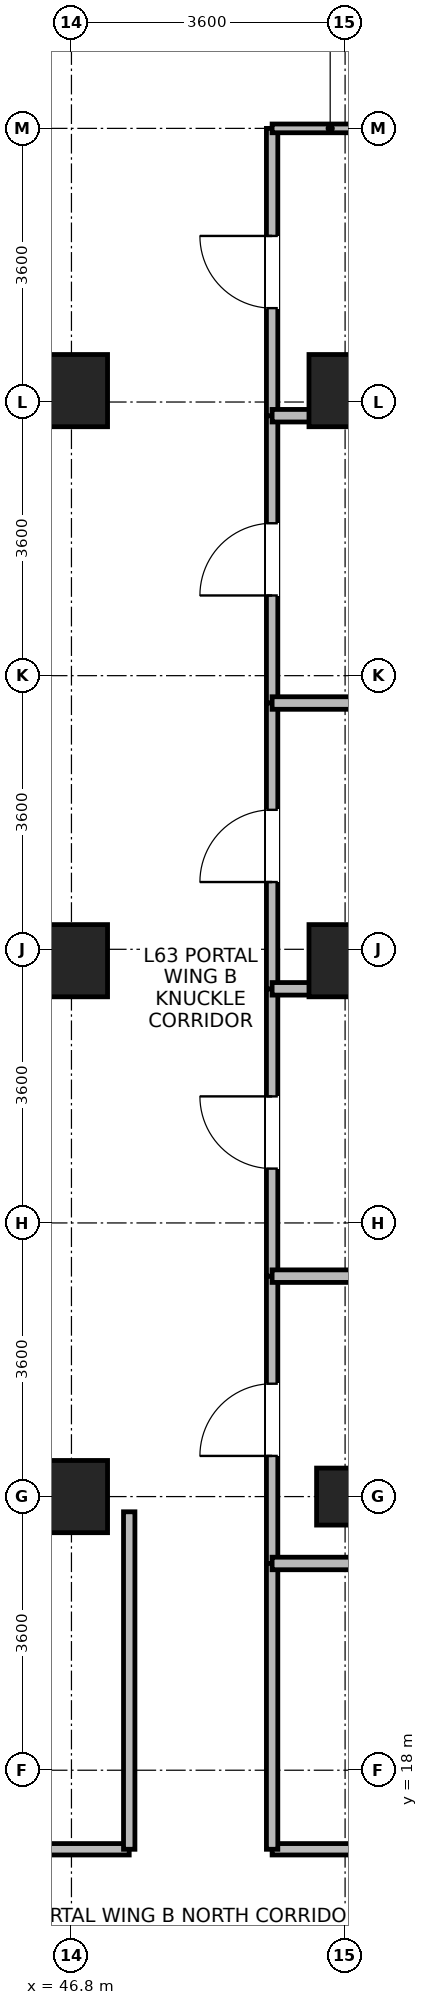
"""IFC4 building model, lengths in metres.
Left out: names, types, materials, properties, quantities, classifications, styles, units other than length and angle.
Written with IfcOpenShell. Run it as: python <this file> out.ifc"""

import sys

from ifc_helpers import new_model, si_unit, direction, frame, frame_2d, origin, origin_2d, place, context, subcontext, project, spatial, rectangle, extrude, source, transform, mapped, element, fill, save


model = new_model("IFC4")
c1 = context("Model", 3, precision=1e-05, world=origin(), true_north=direction((0.0, 1.0)))
c2 = subcontext(c1, "Body", "Model", "MODEL_VIEW")
j1 = project(units=[si_unit("LENGTHUNIT", "METRE"), si_unit("PLANEANGLEUNIT", "RADIAN")], contexts=[c1])
p1 = place(None, origin())
s1 = spatial("IfcSite", under=j1, at=p1, CompositionType="ELEMENT")
p2 = place(p1, origin())
s2 = spatial("IfcBuilding", under=s1, at=p2, CompositionType="ELEMENT")
p3 = place(p2, frame((0.0, 0.0, 246.2)))
s3 = spatial("IfcBuildingStorey", under=s2, at=p3, CompositionType="ELEMENT", Elevation=246.2)
m1 = source(origin(), c2, "Body", "SweptSolid", [
    extrude(rectangle(XDim=0.95, YDim=0.95, at=origin_2d()), origin(), (0.0, 0.0, 1.0), 3.7),
])
for number, where, z_axis, x_axis in (
    (1, (46.8, 21.6, 0.0), (0.0, 0.0, 1.0), (1.0, 0.0, 0.0)),
    (2, (46.8, 28.65, 0.0), (0.0, 0.0, 1.0), (1.0, 0.0, 0.0)),
    (3, (46.8, 36.15, 0.0), (0.0, 0.0, 1.0), (1.0, 0.0, 0.0)),
):
    element("IfcColumn", number, at=place(p3, frame(where, z_axis=z_axis, x_axis=x_axis)), inside=s3, PredefinedType="COLUMN", context=c2, shape_type="MappedRepresentation", body=[
        mapped(m1, transform((0.0, 0.0, 0.0), x_axis=(1.0, 0.0, 0.0), y_axis=(0.0, 1.0, 0.0), z_axis=(0.0, 0.0, 1.0), scale=1.0)),
    ])
m2 = source(origin(), c2, "Body", "SweptSolid", [
    extrude(rectangle(XDim=0.75, YDim=0.75, at=origin_2d()), origin(), (0.0, 0.0, 1.0), 3.7),
])
p4 = place(p3, frame((50.4, 21.6, 0.0), z_axis=(0.0, 0.0, 1.0), x_axis=(1.0, 0.0, 0.0)))
e4 = element("IfcColumn", 4, at=p4, inside=s3, PredefinedType="PILASTER", context=c2, shape_type="MappedRepresentation", body=[
    mapped(m2, transform((0.0, 0.0, 0.0), x_axis=(1.0, 0.0, 0.0), y_axis=(0.0, 1.0, 0.0), z_axis=(0.0, 0.0, 1.0), scale=1.0)),
])
for number, where, z_axis, x_axis in (
    (5, (50.4, 28.65, 0.0), (0.0, 0.0, 1.0), (1.0, 0.0, 0.0)),
    (6, (50.4, 36.15, 0.0), (0.0, 0.0, 1.0), (1.0, 0.0, 0.0)),
):
    element("IfcColumn", number, at=place(p3, frame(where, z_axis=z_axis, x_axis=x_axis)), inside=s3, PredefinedType="COLUMN", context=c2, shape_type="MappedRepresentation", body=[
        mapped(m1, transform((0.0, 0.0, 0.0), x_axis=(1.0, 0.0, 0.0), y_axis=(0.0, 1.0, 0.0), z_axis=(0.0, 0.0, 1.0), scale=1.0)),
    ])
p5 = place(p3, frame((35.52, 16.96, 0.0), z_axis=(0.0, 0.0, 1.0), x_axis=(1.0, 0.0, 0.0)))
e7 = element("IfcWall", 7, at=p5, inside=s3, PredefinedType="PARTITIONING", context=c2, shape_type="SweptSolid", body=[
    extrude(rectangle(XDim=12.04, YDim=0.15, at=frame_2d((6.02, 0.0))), origin(), (0.0, 0.0, 1.0), 3.26),
])
p6 = place(p5, frame((5.37, 0.0, 0.0)))
e8 = element("IfcOpeningElement", 8, at=p6, cuts=e7, PredefinedType="OPENING", context=c2, shape_type="SweptSolid", body=[
    extrude(rectangle(XDim=1.3, YDim=2.12, at=frame_2d((0.65, 1.06))), frame((0.0, 0.085, 0.0), z_axis=(0.0, -1.0, 0.0), x_axis=(1.0, 0.0, 0.0)), (0.0, 0.0, 1.0), 0.17),
])
p7 = place(p3, frame((49.44, 16.96, 0.0), z_axis=(0.0, 0.0, 1.0), x_axis=(1.0, 0.0, 0.0)))
e9 = element("IfcWall", 9, at=p7, inside=s3, PredefinedType="PARTITIONING", context=c2, shape_type="SweptSolid", body=[
    extrude(rectangle(XDim=11.128, YDim=0.15, at=frame_2d((5.564, 0.0))), origin(), (0.0, 0.0, 1.0), 3.26),
])
p8 = place(p7, frame((5.089, 0.0, 0.0)))
e10 = element("IfcOpeningElement", 10, at=p8, cuts=e9, PredefinedType="OPENING", context=c2, shape_type="SweptSolid", body=[
    extrude(rectangle(XDim=0.95, YDim=2.1, at=frame_2d((0.475, 1.05))), frame((0.0, 0.085, 0.0), z_axis=(0.0, -1.0, 0.0), x_axis=(1.0, 0.0, 0.0)), (0.0, 0.0, 1.0), 0.17),
])
p9 = place(p3, frame((47.56, 16.96, 0.0), z_axis=(0.0, 0.0, 1.0), x_axis=(0.0, 1.0, 0.0)))
e11 = element("IfcWall", 11, at=p9, inside=s3, PredefinedType="PARTITIONING", context=c2, shape_type="SweptSolid", body=[
    extrude(rectangle(XDim=4.44, YDim=0.15, at=frame_2d((2.22, 0.0))), origin(), (0.0, 0.0, 1.0), 3.26),
])
p10 = place(p3, frame((49.44, 20.72, 0.0), z_axis=(0.0, 0.0, 1.0), x_axis=(0.0, 1.0, 0.0)))
e12 = element("IfcWall", 12, at=p10, inside=s3, PredefinedType="PARTITIONING", context=c2, shape_type="SweptSolid", body=[
    extrude(rectangle(XDim=3.78, YDim=0.15, at=frame_2d((1.89, 0.0))), origin(), (0.0, 0.0, 1.0), 3.26),
])
p11 = place(p10, frame((1.415, 0.0, 0.0)))
e13 = element("IfcOpeningElement", 13, at=p11, cuts=e12, PredefinedType="OPENING", context=c2, shape_type="SweptSolid", body=[
    extrude(rectangle(XDim=0.95, YDim=2.1, at=frame_2d((0.475, 1.05))), frame((0.0, 0.085, 0.0), z_axis=(0.0, -1.0, 0.0), x_axis=(1.0, 0.0, 0.0)), (0.0, 0.0, 1.0), 0.17),
])
p12 = place(p3, frame((49.44, 24.5, 0.0), z_axis=(0.0, 0.0, 1.0), x_axis=(0.0, 1.0, 0.0)))
e14 = element("IfcWall", 14, at=p12, inside=s3, PredefinedType="PARTITIONING", context=c2, shape_type="SweptSolid", body=[
    extrude(rectangle(XDim=3.78, YDim=0.15, at=frame_2d((1.89, 0.0))), origin(), (0.0, 0.0, 1.0), 3.26),
])
p13 = place(p12, frame((1.415, 0.0, 0.0)))
e15 = element("IfcOpeningElement", 15, at=p13, cuts=e14, PredefinedType="OPENING", context=c2, shape_type="SweptSolid", body=[
    extrude(rectangle(XDim=0.95, YDim=2.1, at=frame_2d((0.475, 1.05))), frame((0.0, 0.085, 0.0), z_axis=(0.0, -1.0, 0.0), x_axis=(1.0, 0.0, 0.0)), (0.0, 0.0, 1.0), 0.17),
])
p14 = place(p3, frame((49.44, 32.04, 0.0), z_axis=(0.0, 0.0, 1.0), x_axis=(0.0, 1.0, 0.0)))
e16 = element("IfcWall", 16, at=p14, inside=s3, PredefinedType="PARTITIONING", context=c2, shape_type="SweptSolid", body=[
    extrude(rectangle(XDim=3.78, YDim=0.15, at=frame_2d((1.89, 0.0))), origin(), (0.0, 0.0, 1.0), 3.26),
])
p15 = place(p14, frame((1.415, 0.0, 0.0)))
e17 = element("IfcOpeningElement", 17, at=p15, cuts=e16, PredefinedType="OPENING", context=c2, shape_type="SweptSolid", body=[
    extrude(rectangle(XDim=0.95, YDim=2.1, at=frame_2d((0.475, 1.05))), frame((0.0, 0.085, 0.0), z_axis=(0.0, -1.0, 0.0), x_axis=(1.0, 0.0, 0.0)), (0.0, 0.0, 1.0), 0.17),
])
p16 = place(p3, frame((49.44, 35.82, 0.0), z_axis=(0.0, 0.0, 1.0), x_axis=(0.0, 1.0, 0.0)))
e18 = element("IfcWall", 18, at=p16, inside=s3, PredefinedType="PARTITIONING", context=c2, shape_type="SweptSolid", body=[
    extrude(rectangle(XDim=3.78, YDim=0.15, at=frame_2d((1.89, 0.0))), origin(), (0.0, 0.0, 1.0), 3.26),
])
p17 = place(p16, frame((1.415, 0.0, 0.0)))
e19 = element("IfcOpeningElement", 19, at=p17, cuts=e18, PredefinedType="OPENING", context=c2, shape_type="SweptSolid", body=[
    extrude(rectangle(XDim=0.95, YDim=2.1, at=frame_2d((0.475, 1.05))), frame((0.0, 0.085, 0.0), z_axis=(0.0, -1.0, 0.0), x_axis=(1.0, 0.0, 0.0)), (0.0, 0.0, 1.0), 0.17),
])
p18 = place(p3, frame((49.44, 16.96, 0.0), z_axis=(0.0, 0.0, 1.0), x_axis=(0.0, 1.0, 0.0)))
e20 = element("IfcWall", 20, at=p18, inside=s3, PredefinedType="PARTITIONING", context=c2, shape_type="SweptSolid", body=[
    extrude(rectangle(XDim=3.76, YDim=0.15, at=frame_2d((1.88, 0.0))), origin(), (0.0, 0.0, 1.0), 3.26),
])
p19 = place(p3, frame((49.44, 28.28, 0.0), z_axis=(0.0, 0.0, 1.0), x_axis=(0.0, 1.0, 0.0)))
e21 = element("IfcWall", 21, at=p19, inside=s3, PredefinedType="PARTITIONING", context=c2, shape_type="SweptSolid", body=[
    extrude(rectangle(XDim=3.76, YDim=0.15, at=frame_2d((1.88, 0.0))), origin(), (0.0, 0.0, 1.0), 3.26),
])
p20 = place(p19, frame((1.405, 0.0, 0.0)))
e22 = element("IfcOpeningElement", 22, at=p20, cuts=e21, PredefinedType="OPENING", context=c2, shape_type="SweptSolid", body=[
    extrude(rectangle(XDim=0.95, YDim=2.1, at=frame_2d((0.475, 1.05))), frame((0.0, 0.085, 0.0), z_axis=(0.0, -1.0, 0.0), x_axis=(1.0, 0.0, 0.0)), (0.0, 0.0, 1.0), 0.17),
])
for number, where, z_axis, x_axis in (
    (23, (49.44, 20.72, 0.0), (0.0, 0.0, 1.0), (1.0, 0.0, 0.0)),
    (24, (49.44, 24.5, 0.0), (0.0, 0.0, 1.0), (1.0, 0.0, 0.0)),
    (25, (49.44, 28.28, 0.0), (0.0, 0.0, 1.0), (1.0, 0.0, 0.0)),
    (26, (49.44, 32.04, 0.0), (0.0, 0.0, 1.0), (1.0, 0.0, 0.0)),
    (27, (49.44, 35.82, 0.0), (0.0, 0.0, 1.0), (1.0, 0.0, 0.0)),
):
    element("IfcWall", number, at=place(p3, frame(where, z_axis=z_axis, x_axis=x_axis)), inside=s3, PredefinedType="PARTITIONING", context=c2, shape_type="SweptSolid", body=[
        extrude(rectangle(XDim=11.128, YDim=0.165, at=frame_2d((5.564, 0.0))), origin(), (0.0, 0.0, 1.0), 3.26),
    ])
p21 = place(p3, frame((49.44, 39.6, 0.0), z_axis=(0.0, 0.0, 1.0), x_axis=(1.0, 0.0, 0.0)))
e28 = element("IfcWall", 28, at=p21, inside=s3, PredefinedType="PARTITIONING", context=c2, shape_type="SweptSolid", body=[
    extrude(rectangle(XDim=1.528, YDim=0.115, at=frame_2d((0.764, 0.0))), origin(), (0.0, 0.0, 1.0), 3.26),
])
p22 = place(p11, origin())
e29 = element("IfcDoor", 29, at=p22, inside=s3, OperationType="SINGLE_SWING_LEFT", PredefinedType="DOOR", context=c2, shape_type="SweptSolid", body=[
    extrude(rectangle(XDim=0.95, YDim=2.1, at=frame_2d((0.475, 1.05))), frame((0.0, 0.025, 0.0), z_axis=(0.0, -1.0, 0.0), x_axis=(1.0, 0.0, 0.0)), (0.0, 0.0, 1.0), 0.05),
])
fill(e13, e29)
p23 = place(p13, origin())
e30 = element("IfcDoor", 30, at=p23, inside=s3, OperationType="SINGLE_SWING_RIGHT", PredefinedType="DOOR", context=c2, shape_type="SweptSolid", body=[
    extrude(rectangle(XDim=0.95, YDim=2.1, at=frame_2d((0.475, 1.05))), frame((0.0, 0.025, 0.0), z_axis=(0.0, -1.0, 0.0), x_axis=(1.0, 0.0, 0.0)), (0.0, 0.0, 1.0), 0.05),
])
fill(e15, e30)
p24 = place(p15, origin())
e31 = element("IfcDoor", 31, at=p24, inside=s3, OperationType="SINGLE_SWING_LEFT", PredefinedType="DOOR", context=c2, shape_type="SweptSolid", body=[
    extrude(rectangle(XDim=0.95, YDim=2.1, at=frame_2d((0.475, 1.05))), frame((0.0, 0.025, 0.0), z_axis=(0.0, -1.0, 0.0), x_axis=(1.0, 0.0, 0.0)), (0.0, 0.0, 1.0), 0.05),
])
fill(e17, e31)
p25 = place(p17, origin())
e32 = element("IfcDoor", 32, at=p25, inside=s3, OperationType="SINGLE_SWING_RIGHT", PredefinedType="DOOR", context=c2, shape_type="SweptSolid", body=[
    extrude(rectangle(XDim=0.95, YDim=2.1, at=frame_2d((0.475, 1.05))), frame((0.0, 0.025, 0.0), z_axis=(0.0, -1.0, 0.0), x_axis=(1.0, 0.0, 0.0)), (0.0, 0.0, 1.0), 0.05),
])
fill(e19, e32)
p26 = place(p20, origin())
e33 = element("IfcDoor", 33, at=p26, inside=s3, OperationType="SINGLE_SWING_LEFT", PredefinedType="DOOR", context=c2, shape_type="SweptSolid", body=[
    extrude(rectangle(XDim=0.95, YDim=2.1, at=frame_2d((0.475, 1.05))), frame((0.0, 0.025, 0.0), z_axis=(0.0, -1.0, 0.0), x_axis=(1.0, 0.0, 0.0)), (0.0, 0.0, 1.0), 0.05),
])
fill(e22, e33)
save(model, sys.argv[1])
